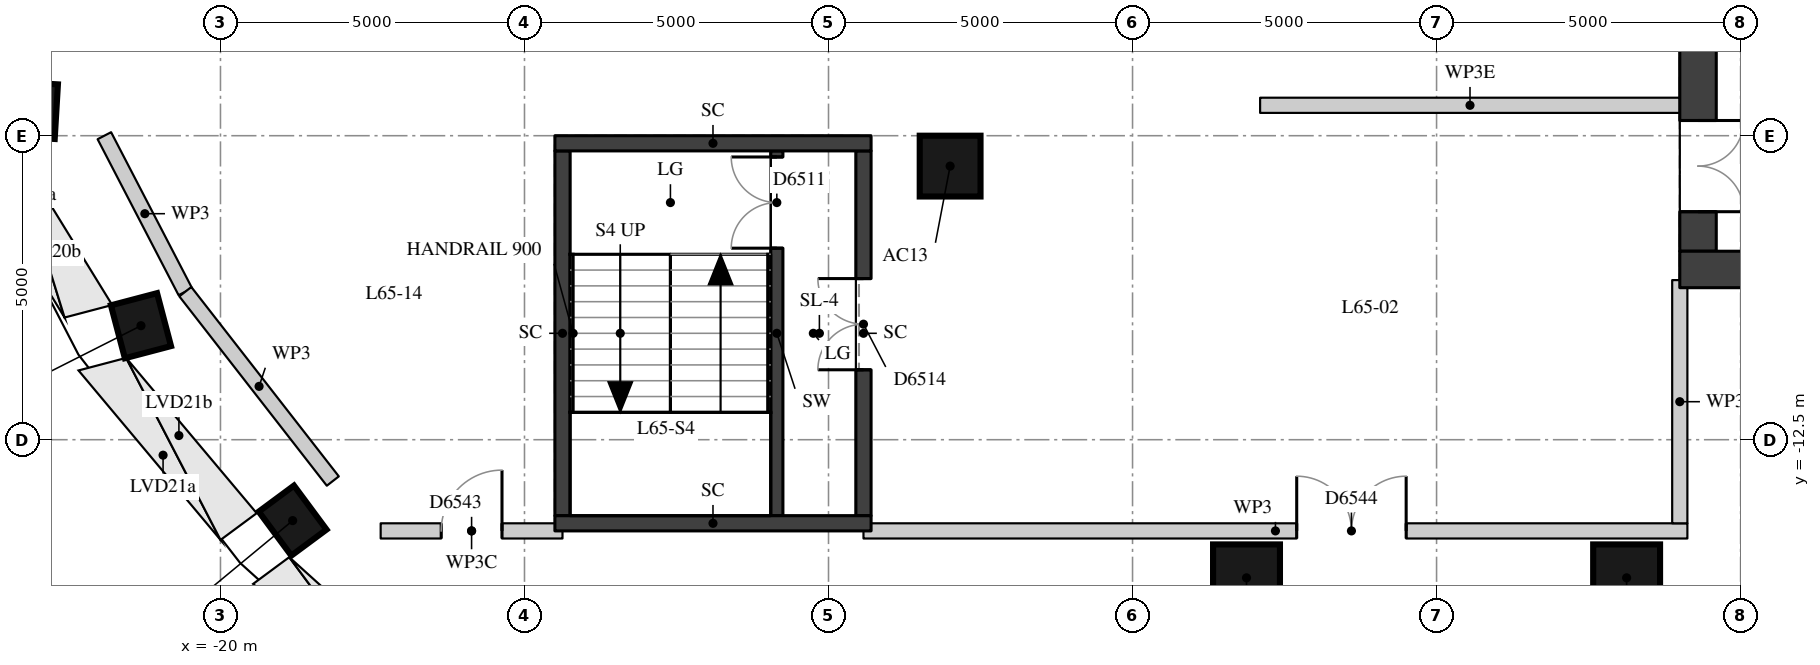
"""IFC4 building model, lengths in metres.
Left out: names, types, materials, properties, quantities, classifications, styles, units other than length and angle.
Written with IfcOpenShell. Run it as: python <this file> out.ifc"""

import sys

from ifc_helpers import new_model, si_unit, direction, frame, frame_2d, origin, origin_2d, place, context, subcontext, project, spatial, rectangle, extrude, element, fill, save


model = new_model("IFC4")
c1 = context("Model", 3, precision=1e-05, world=origin(), true_north=direction((0.0, 1.0)))
c2 = subcontext(c1, "Body", "Model", "MODEL_VIEW")
j1 = project(units=[si_unit("LENGTHUNIT", "METRE"), si_unit("PLANEANGLEUNIT", "RADIAN")], contexts=[c1])
p1 = place(None, origin())
s1 = spatial("IfcSite", under=j1, at=p1, CompositionType="ELEMENT")
p2 = place(p1, origin())
s2 = spatial("IfcBuilding", under=s1, at=p2, CompositionType="ELEMENT")
p3 = place(p2, frame((0.0, 0.0, 228.8)))
s3 = spatial("IfcBuildingStorey", under=s2, at=p3, CompositionType="ELEMENT", Elevation=228.8)
p4 = place(p3, frame((-23.591, -7.052, 0.156), z_axis=(0.208204450903, -0.012317765378, 0.978007760337), x_axis=(-0.976300664505, 0.057759776372, 0.208568503662)))
e1 = element("IfcColumn", 1, at=p4, inside=s3, PredefinedType="COLUMN", context=c2, shape_type="SweptSolid", body=[
    extrude(rectangle(XDim=1.5, YDim=0.9, at=origin_2d()), origin(), (0.0, 0.0, 1.0), 4.281),
])
p5 = place(p3, frame((-21.687, -10.725, 0.137), z_axis=(0.17653160293, 0.046575262034, 0.983192421723), x_axis=(-0.950661680731, -0.250818075354, 0.182572346938)))
e2 = element("IfcColumn", 2, at=p5, inside=s3, PredefinedType="COLUMN", context=c2, shape_type="SweptSolid", body=[
    extrude(rectangle(XDim=1.5, YDim=0.9, at=origin_2d()), origin(), (0.0, 0.0, 1.0), 4.298),
])
p6 = place(p3, frame((-19.102, -14.045, 0.125), z_axis=(0.13430987924, 0.099415368227, 0.985939876919), x_axis=(-0.792466261243, -0.586578780464, 0.167100446143)))
e3 = element("IfcColumn", 3, at=p6, inside=s3, PredefinedType="COLUMN", context=c2, shape_type="SweptSolid", body=[
    extrude(rectangle(XDim=1.5, YDim=0.9, at=origin_2d()), origin(), (0.0, 0.0, 1.0), 4.31),
])
p7 = place(p3, frame((-8.0, -8.0, 0.0), z_axis=(0.0, 0.0, 1.0), x_axis=(1.0, 0.0, 0.0)))
e4 = element("IfcColumn", 4, at=p7, inside=s3, PredefinedType="COLUMN", context=c2, shape_type="SweptSolid", body=[
    extrude(rectangle(XDim=1.0, YDim=1.0, at=origin_2d()), origin(), (0.0, 0.0, 1.0), 4.5),
])
for number, where, z_axis, x_axis in (
    (5, (-3.126, -14.772, 0.0), (0.0, 0.0, 1.0), (1.0, 0.0, 0.0)),
    (6, (3.126, -14.772, 0.0), (0.0, 0.0, 1.0), (1.0, 0.0, 0.0)),
):
    element("IfcColumn", number, at=place(p3, frame(where, z_axis=z_axis, x_axis=x_axis)), inside=s3, PredefinedType="COLUMN", context=c2, shape_type="SweptSolid", body=[
        extrude(rectangle(XDim=1.1, YDim=1.1, at=origin_2d()), origin(), (0.0, 0.0, 1.0), 4.5),
    ])
p8 = place(p3, frame((4.3, -9.4, 0.0), z_axis=(0.0, 0.0, 1.0), x_axis=(0.0, 1.0, 0.0)))
e7 = element("IfcWall", 7, at=p8, inside=s3, PredefinedType="SHEAR", context=c2, shape_type="SweptSolid", body=[
    extrude(rectangle(XDim=18.8, YDim=0.6, at=frame_2d((9.4, 0.0))), origin(), (0.0, 0.0, 1.0), 4.22),
])
p9 = place(p8, frame((0.65, 0.0, 0.0)))
e8 = element("IfcOpeningElement", 8, at=p9, cuts=e7, PredefinedType="OPENING", context=c2, shape_type="SweptSolid", body=[
    extrude(rectangle(XDim=1.5, YDim=2.1, at=frame_2d((0.75, 1.05))), frame((0.0, 0.31, 0.0), z_axis=(0.0, -1.0, 0.0), x_axis=(1.0, 0.0, 0.0)), (0.0, 0.0, 1.0), 0.62),
])
p10 = place(p8, frame((3.75, 0.0, 0.0)))
e9 = element("IfcOpeningElement", 9, at=p10, cuts=e7, PredefinedType="OPENING", context=c2, shape_type="SweptSolid", body=[
    extrude(rectangle(XDim=1.8, YDim=2.1, at=frame_2d((0.9, 1.05))), frame((0.0, 0.31, 0.0), z_axis=(0.0, -1.0, 0.0), x_axis=(1.0, 0.0, 0.0)), (0.0, 0.0, 1.0), 0.62),
])
p11 = place(p8, frame((6.25, 0.0, 0.0)))
e10 = element("IfcOpeningElement", 10, at=p11, cuts=e7, PredefinedType="OPENING", context=c2, shape_type="SweptSolid", body=[
    extrude(rectangle(XDim=1.1, YDim=2.1, at=frame_2d((0.55, 1.05))), frame((0.0, 0.31, 0.0), z_axis=(0.0, -1.0, 0.0), x_axis=(1.0, 0.0, 0.0)), (0.0, 0.0, 1.0), 0.62),
])
p12 = place(p8, frame((8.9, 0.0, 0.0)))
e11 = element("IfcOpeningElement", 11, at=p12, cuts=e7, PredefinedType="OPENING", context=c2, shape_type="SweptSolid", body=[
    extrude(rectangle(XDim=1.0, YDim=2.1, at=frame_2d((0.5, 1.05))), frame((0.0, 0.31, 0.0), z_axis=(0.0, -1.0, 0.0), x_axis=(1.0, 0.0, 0.0)), (0.0, 0.0, 1.0), 0.62),
])
p13 = place(p8, frame((11.45, 0.0, 0.0)))
e12 = element("IfcOpeningElement", 12, at=p13, cuts=e7, PredefinedType="OPENING", context=c2, shape_type="SweptSolid", body=[
    extrude(rectangle(XDim=1.1, YDim=2.1, at=frame_2d((0.55, 1.05))), frame((0.0, 0.31, 0.0), z_axis=(0.0, -1.0, 0.0), x_axis=(1.0, 0.0, 0.0)), (0.0, 0.0, 1.0), 0.62),
])
p14 = place(p8, frame((13.25, 0.0, 0.0)))
e13 = element("IfcOpeningElement", 13, at=p14, cuts=e7, PredefinedType="OPENING", context=c2, shape_type="SweptSolid", body=[
    extrude(rectangle(XDim=1.8, YDim=2.1, at=frame_2d((0.9, 1.05))), frame((0.0, 0.31, 0.0), z_axis=(0.0, -1.0, 0.0), x_axis=(1.0, 0.0, 0.0)), (0.0, 0.0, 1.0), 0.62),
])
p15 = place(p8, frame((16.65, 0.0, 0.0)))
e14 = element("IfcOpeningElement", 14, at=p15, cuts=e7, PredefinedType="OPENING", context=c2, shape_type="SweptSolid", body=[
    extrude(rectangle(XDim=1.5, YDim=2.1, at=frame_2d((0.75, 1.05))), frame((0.0, 0.31, 0.0), z_axis=(0.0, -1.0, 0.0), x_axis=(1.0, 0.0, 0.0)), (0.0, 0.0, 1.0), 0.62),
])
p16 = place(p3, frame((4.0, -9.7, 0.0), z_axis=(0.0, 0.0, 1.0), x_axis=(1.0, 0.0, 0.0)))
e15 = element("IfcWall", 15, at=p16, inside=s3, PredefinedType="SHEAR", context=c2, shape_type="SweptSolid", body=[
    extrude(rectangle(XDim=12.0, YDim=0.6, at=frame_2d((6.0, 0.0))), origin(), (0.0, 0.0, 1.0), 4.22),
])
p17 = place(p3, frame((-10.85, -13.75, 0.0), z_axis=(0.0, 0.0, 1.0), x_axis=(0.0, 1.0, 0.0)))
e16 = element("IfcWall", 16, at=p17, inside=s3, PredefinedType="SHEAR", context=c2, shape_type="SweptSolid", body=[
    extrude(rectangle(XDim=6.0, YDim=0.2, at=frame_2d((3.0, 0.0))), origin(), (0.0, 0.0, 1.0), 4.22),
])
p18 = place(p17, frame((4.4, 0.0, 0.0)))
e17 = element("IfcOpeningElement", 17, at=p18, cuts=e16, PredefinedType="OPENING", context=c2, shape_type="SweptSolid", body=[
    extrude(rectangle(XDim=1.5, YDim=2.1, at=frame_2d((0.75, 1.05))), frame((0.0, 0.11, 0.0), z_axis=(0.0, -1.0, 0.0), x_axis=(1.0, 0.0, 0.0)), (0.0, 0.0, 1.0), 0.22),
])
p19 = place(p3, frame((-14.375, -13.75, -0.45), z_axis=(0.0, 0.0, 1.0), x_axis=(0.0, 1.0, 0.0)))
e18 = element("IfcWall", 18, at=p19, inside=s3, PredefinedType="SHEAR", context=c2, shape_type="SweptSolid", body=[
    extrude(rectangle(XDim=6.0, YDim=0.25, at=frame_2d((3.0, 0.0))), origin(), (0.0, 0.0, 1.0), 4.67),
])
p20 = place(p3, frame((-9.425, -13.75, -0.45), z_axis=(0.0, 0.0, 1.0), x_axis=(0.0, 1.0, 0.0)))
e19 = element("IfcWall", 19, at=p20, inside=s3, PredefinedType="SHEAR", context=c2, shape_type="SweptSolid", body=[
    extrude(rectangle(XDim=6.0, YDim=0.25, at=frame_2d((3.0, 0.0))), origin(), (0.0, 0.0, 1.0), 4.67),
])
p21 = place(p20, frame((2.4, 0.0, 0.45)))
e20 = element("IfcOpeningElement", 20, at=p21, cuts=e19, PredefinedType="OPENING", context=c2, shape_type="SweptSolid", body=[
    extrude(rectangle(XDim=1.5, YDim=2.1, at=frame_2d((0.75, 1.05))), frame((0.0, 0.135, 0.0), z_axis=(0.0, -1.0, 0.0), x_axis=(1.0, 0.0, 0.0)), (0.0, 0.0, 1.0), 0.27),
])
for number, where, z_axis, x_axis in (
    (21, (-14.5, -7.625, -0.45), (0.0, 0.0, 1.0), (1.0, 0.0, 0.0)),
    (22, (-14.5, -13.875, -0.45), (0.0, 0.0, 1.0), (1.0, 0.0, 0.0)),
):
    element("IfcWall", number, at=place(p3, frame(where, z_axis=z_axis, x_axis=x_axis)), inside=s3, PredefinedType="SHEAR", context=c2, shape_type="SweptSolid", body=[
        extrude(rectangle(XDim=5.2, YDim=0.25, at=frame_2d((2.6, 0.0))), origin(), (0.0, 0.0, 1.0), 4.67),
    ])
p22 = place(p3, frame((-21.909, -7.5, 0.0), z_axis=(0.0, 0.0, 1.0), x_axis=(0.460642554011, -0.887585735259, 0.0)))
e23 = element("IfcWall", 23, at=p22, inside=s3, PredefinedType="PARTITIONING", context=c2, shape_type="SweptSolid", body=[
    extrude(rectangle(XDim=2.891, YDim=0.25, at=frame_2d((1.445, 0.0))), origin(), (0.0, 0.0, 1.0), 4.22),
])
p23 = place(p3, frame((-20.578, -10.066, 0.0), z_axis=(0.0, 0.0, 1.0), x_axis=(0.614467142593, -0.788942412774, 0.0)))
e24 = element("IfcWall", 24, at=p23, inside=s3, PredefinedType="PARTITIONING", context=c2, shape_type="SweptSolid", body=[
    extrude(rectangle(XDim=3.947, YDim=0.25, at=frame_2d((1.974, 0.0))), origin(), (0.0, 0.0, 1.0), 4.22),
])
p24 = place(p3, frame((-17.365, -14.0, 0.0), z_axis=(0.0, 0.0, 1.0), x_axis=(1.0, 0.0, 0.0)))
e25 = element("IfcWall", 25, at=p24, inside=s3, PredefinedType="PARTITIONING", context=c2, shape_type="SweptSolid", body=[
    extrude(rectangle(XDim=2.99, YDim=0.25, at=frame_2d((1.495, 0.0))), origin(), (0.0, 0.0, 1.0), 3.77),
])
p25 = place(p24, frame((0.995, 0.0, 0.0)))
e26 = element("IfcOpeningElement", 26, at=p25, cuts=e25, PredefinedType="OPENING", context=c2, shape_type="SweptSolid", body=[
    extrude(rectangle(XDim=1.0, YDim=2.1, at=frame_2d((0.5, 1.05))), frame((0.0, 0.135, 0.0), z_axis=(0.0, -1.0, 0.0), x_axis=(1.0, 0.0, 0.0)), (0.0, 0.0, 1.0), 0.27),
])
p26 = place(p3, frame((-9.425, -14.0, 0.0), z_axis=(0.0, 0.0, 1.0), x_axis=(1.0, 0.0, 0.0)))
e27 = element("IfcWall", 27, at=p26, inside=s3, PredefinedType="PARTITIONING", context=c2, shape_type="SweptSolid", body=[
    extrude(rectangle(XDim=13.55, YDim=0.25, at=frame_2d((6.775, 0.0))), origin(), (0.0, 0.0, 1.0), 4.22),
])
p27 = place(p26, frame((7.125, 0.0, 0.0)))
e28 = element("IfcOpeningElement", 28, at=p27, cuts=e27, PredefinedType="OPENING", context=c2, shape_type="SweptSolid", body=[
    extrude(rectangle(XDim=1.8, YDim=2.1, at=frame_2d((0.9, 1.05))), frame((0.0, 0.135, 0.0), z_axis=(0.0, -1.0, 0.0), x_axis=(1.0, 0.0, 0.0)), (0.0, 0.0, 1.0), 0.27),
])
p28 = place(p3, frame((-2.902, -7.0, 0.0), z_axis=(0.0, 0.0, 1.0), x_axis=(1.0, 0.0, 0.0)))
e29 = element("IfcWall", 29, at=p28, inside=s3, PredefinedType="PARTITIONING", context=c2, shape_type="SweptSolid", body=[
    extrude(rectangle(XDim=6.904, YDim=0.25, at=frame_2d((3.452, 0.0))), origin(), (0.0, 0.0, 1.0), 3.67),
])
p29 = place(p3, frame((4.0, -13.875, 0.0), z_axis=(0.0, 0.0, 1.0), x_axis=(0.0, 1.0, 0.0)))
e30 = element("IfcWall", 30, at=p29, inside=s3, PredefinedType="PARTITIONING", context=c2, shape_type="SweptSolid", body=[
    extrude(rectangle(XDim=4.0, YDim=0.25, at=frame_2d((2.0, 0.0))), origin(), (0.0, 0.0, 1.0), 4.22),
])
p30 = place(p9, origin())
e31 = element("IfcDoor", 31, at=p30, inside=s3, OperationType="DOUBLE_DOOR_SINGLE_SWING", PredefinedType="DOOR", context=c2, shape_type="SweptSolid", body=[
    extrude(rectangle(XDim=1.5, YDim=2.1, at=frame_2d((0.75, 1.05))), frame((0.0, 0.025, 0.0), z_axis=(0.0, -1.0, 0.0), x_axis=(1.0, 0.0, 0.0)), (0.0, 0.0, 1.0), 0.05),
])
fill(e8, e31)
p31 = place(p18, origin())
e32 = element("IfcDoor", 32, at=p31, inside=s3, OperationType="DOUBLE_DOOR_SINGLE_SWING", PredefinedType="DOOR", context=c2, shape_type="SweptSolid", body=[
    extrude(rectangle(XDim=1.5, YDim=2.1, at=frame_2d((0.75, 1.05))), frame((0.0, 0.025, 0.0), z_axis=(0.0, -1.0, 0.0), x_axis=(1.0, 0.0, 0.0)), (0.0, 0.0, 1.0), 0.05),
])
fill(e17, e32)
p32 = place(p21, origin())
e33 = element("IfcDoor", 33, at=p32, inside=s3, OperationType="DOUBLE_DOOR_SINGLE_SWING", PredefinedType="DOOR", context=c2, shape_type="SweptSolid", body=[
    extrude(rectangle(XDim=1.5, YDim=2.1, at=frame_2d((0.75, 1.05))), frame((0.0, 0.025, 0.0), z_axis=(0.0, -1.0, 0.0), x_axis=(1.0, 0.0, 0.0)), (0.0, 0.0, 1.0), 0.05),
])
fill(e20, e33)
p33 = place(p27, origin())
e34 = element("IfcDoor", 34, at=p33, inside=s3, OperationType="DOUBLE_DOOR_SINGLE_SWING", PredefinedType="DOOR", context=c2, shape_type="SweptSolid", body=[
    extrude(rectangle(XDim=1.8, YDim=2.1, at=frame_2d((0.9, 1.05))), frame((0.0, 0.025, 0.0), z_axis=(0.0, -1.0, 0.0), x_axis=(1.0, 0.0, 0.0)), (0.0, 0.0, 1.0), 0.05),
])
fill(e28, e34)
p34 = place(p25, origin())
e35 = element("IfcDoor", 35, at=p34, inside=s3, OperationType="SINGLE_SWING_RIGHT", PredefinedType="DOOR", context=c2, shape_type="SweptSolid", body=[
    extrude(rectangle(XDim=1.0, YDim=2.1, at=frame_2d((0.5, 1.05))), frame((0.0, 0.025, 0.0), z_axis=(0.0, -1.0, 0.0), x_axis=(1.0, 0.0, 0.0)), (0.0, 0.0, 1.0), 0.05),
])
fill(e26, e35)
save(model, sys.argv[1])
